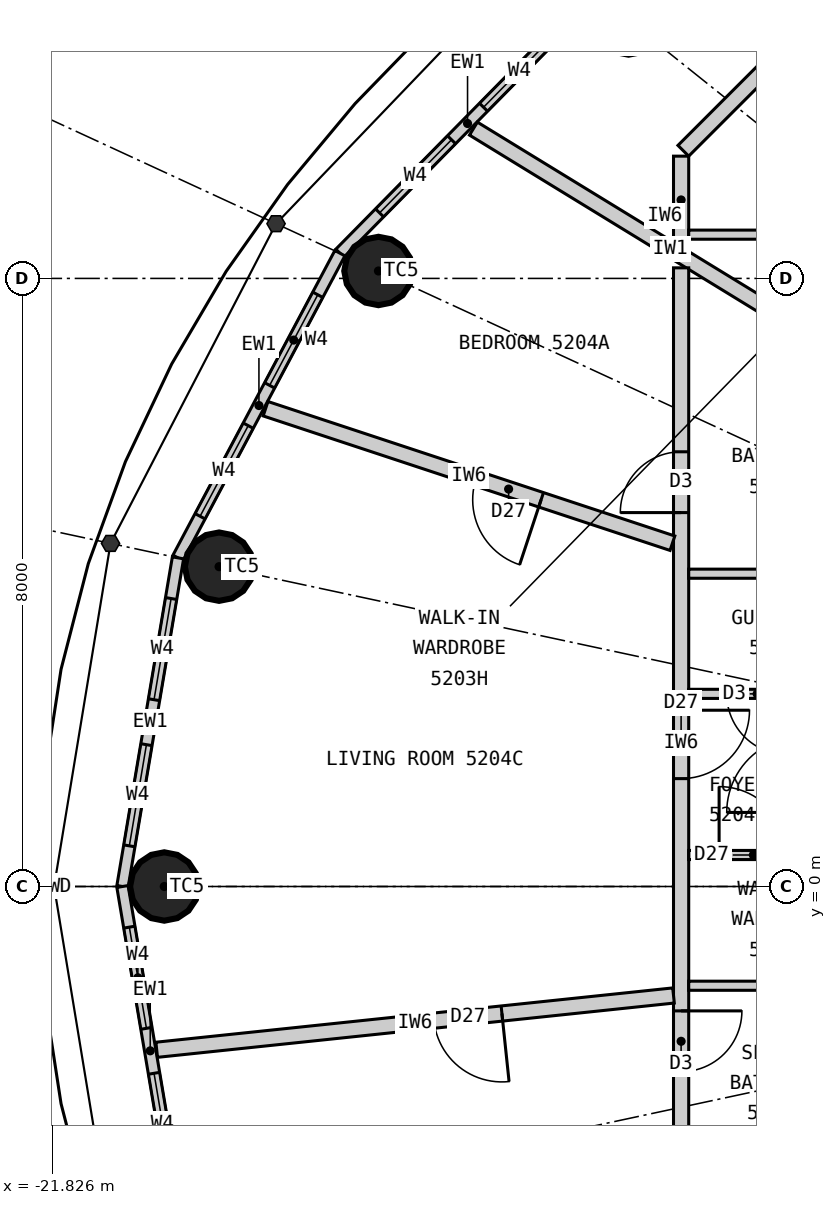
"""IFC4 building model, lengths in metres.
Left out: names, types, materials, properties, quantities, classifications, styles, units other than length and angle.
Written with IfcOpenShell. Run it as: python <this file> out.ifc"""

import sys

from ifc_helpers import new_model, si_unit, direction, frame, frame_2d, origin, origin_2d, place, context, subcontext, project, spatial, rectangle, circle, extrude, element, fill, save


model = new_model("IFC4")
c1 = context("Model", 3, precision=1e-05, world=origin(), true_north=direction((0.0, 1.0)))
c2 = subcontext(c1, "Body", "Model", "MODEL_VIEW")
j1 = project(units=[si_unit("LENGTHUNIT", "METRE"), si_unit("PLANEANGLEUNIT", "RADIAN")], contexts=[c1])
p1 = place(None, origin())
s1 = spatial("IfcSite", under=j1, at=p1, CompositionType="ELEMENT")
p2 = place(p1, origin())
s2 = spatial("IfcBuilding", under=s1, at=p2, CompositionType="ELEMENT")
p3 = place(p2, frame((0.0, 0.0, 196.2)))
s3 = spatial("IfcBuildingStorey", under=s2, at=p3, CompositionType="ELEMENT", Elevation=196.2)
for number, where, z_axis, x_axis in (
    (1, (-14.241, 11.393, 0.0), (0.0, 0.0, 1.0), (1.0, 0.0, 0.0)),
    (2, (-17.532, 8.098, 0.0), (0.0, 0.0, 1.0), (1.0, 0.0, 0.0)),
    (3, (-19.629, 4.208, 0.0), (0.0, 0.0, 1.0), (1.0, 0.0, 0.0)),
    (4, (-20.35, 0.0, 0.0), (0.0, 0.0, 1.0), (1.0, 0.0, 0.0)),
):
    element("IfcColumn", number, at=place(p3, frame(where, z_axis=z_axis, x_axis=x_axis)), inside=s3, PredefinedType="COLUMN", context=c2, shape_type="SweptSolid", body=[
        extrude(circle(Radius=0.45, at=origin_2d()), origin(), (0.0, 0.0, 1.0), 3.3),
    ])
p4 = place(p3, frame((-14.68, 11.744, 0.0), z_axis=(0.0, 0.0, 1.0), x_axis=(-0.701527379618, -0.712642501993, 0.0)))
e5 = element("IfcWall", 5, at=p4, inside=s3, PredefinedType="ELEMENTEDWALL", context=c2, shape_type="SweptSolid", body=[
    extrude(rectangle(XDim=4.788, YDim=0.15, at=frame_2d((2.394, 0.0))), origin(), (0.0, 0.0, 1.0), 3.12),
])
p5 = place(p4, frame((0.744, 0.0, 0.9)))
e6 = element("IfcOpeningElement", 6, at=p5, cuts=e5, PredefinedType="OPENING", context=c2, shape_type="SweptSolid", body=[
    extrude(rectangle(XDim=1.35, YDim=1.9, at=frame_2d((0.675, 0.95))), frame((0.0, 0.085, 0.0), z_axis=(0.0, -1.0, 0.0), x_axis=(1.0, 0.0, 0.0)), (0.0, 0.0, 1.0), 0.17),
])
p6 = place(p4, frame((2.694, 0.0, 0.9)))
e7 = element("IfcOpeningElement", 7, at=p6, cuts=e5, PredefinedType="OPENING", context=c2, shape_type="SweptSolid", body=[
    extrude(rectangle(XDim=1.35, YDim=1.9, at=frame_2d((0.675, 0.95))), frame((0.0, 0.085, 0.0), z_axis=(0.0, -1.0, 0.0), x_axis=(1.0, 0.0, 0.0)), (0.0, 0.0, 1.0), 0.17),
])
p7 = place(p3, frame((-18.04, 8.332, 0.0), z_axis=(0.0, 0.0, 1.0), x_axis=(-0.469256152955, -0.883062094597, 0.0)))
e8 = element("IfcWall", 8, at=p7, inside=s3, PredefinedType="ELEMENTEDWALL", context=c2, shape_type="SweptSolid", body=[
    extrude(rectangle(XDim=4.539, YDim=0.15, at=frame_2d((2.27, 0.0))), origin(), (0.0, 0.0, 1.0), 3.12),
])
p8 = place(p7, frame((0.62, 0.0, 0.9)))
e9 = element("IfcOpeningElement", 9, at=p8, cuts=e8, PredefinedType="OPENING", context=c2, shape_type="SweptSolid", body=[
    extrude(rectangle(XDim=1.35, YDim=1.9, at=frame_2d((0.675, 0.95))), frame((0.0, 0.085, 0.0), z_axis=(0.0, -1.0, 0.0), x_axis=(1.0, 0.0, 0.0)), (0.0, 0.0, 1.0), 0.17),
])
p9 = place(p7, frame((2.57, 0.0, 0.9)))
e10 = element("IfcOpeningElement", 10, at=p9, cuts=e8, PredefinedType="OPENING", context=c2, shape_type="SweptSolid", body=[
    extrude(rectangle(XDim=1.35, YDim=1.9, at=frame_2d((0.675, 0.95))), frame((0.0, 0.085, 0.0), z_axis=(0.0, -1.0, 0.0), x_axis=(1.0, 0.0, 0.0)), (0.0, 0.0, 1.0), 0.17),
])
p10 = place(p3, frame((-20.17, 4.323, 0.0), z_axis=(0.0, 0.0, 1.0), x_axis=(-0.166538513568, -0.986034950445, 0.0)))
e11 = element("IfcWall", 11, at=p10, inside=s3, PredefinedType="ELEMENTEDWALL", context=c2, shape_type="SweptSolid", body=[
    extrude(rectangle(XDim=4.385, YDim=0.15, at=frame_2d((2.192, 0.0))), origin(), (0.0, 0.0, 1.0), 3.12),
])
p11 = place(p10, frame((0.542, 0.0, 0.9)))
e12 = element("IfcOpeningElement", 12, at=p11, cuts=e11, PredefinedType="OPENING", context=c2, shape_type="SweptSolid", body=[
    extrude(rectangle(XDim=1.35, YDim=1.9, at=frame_2d((0.675, 0.95))), frame((0.0, 0.085, 0.0), z_axis=(0.0, -1.0, 0.0), x_axis=(1.0, 0.0, 0.0)), (0.0, 0.0, 1.0), 0.17),
])
p12 = place(p10, frame((2.492, 0.0, 0.9)))
e13 = element("IfcOpeningElement", 13, at=p12, cuts=e11, PredefinedType="OPENING", context=c2, shape_type="SweptSolid", body=[
    extrude(rectangle(XDim=1.35, YDim=1.9, at=frame_2d((0.675, 0.95))), frame((0.0, 0.085, 0.0), z_axis=(0.0, -1.0, 0.0), x_axis=(1.0, 0.0, 0.0)), (0.0, 0.0, 1.0), 0.17),
])
p13 = place(p3, frame((-20.9, 0.0, 0.0), z_axis=(0.0, 0.0, 1.0), x_axis=(0.166538513568, -0.986034950445, 0.0)))
e14 = element("IfcWall", 14, at=p13, inside=s3, PredefinedType="ELEMENTEDWALL", context=c2, shape_type="SweptSolid", body=[
    extrude(rectangle(XDim=4.385, YDim=0.15, at=frame_2d((2.192, 0.0))), origin(), (0.0, 0.0, 1.0), 3.12),
])
p14 = place(p13, frame((0.542, 0.0, 0.9)))
e15 = element("IfcOpeningElement", 15, at=p14, cuts=e14, PredefinedType="OPENING", context=c2, shape_type="SweptSolid", body=[
    extrude(rectangle(XDim=1.35, YDim=1.9, at=frame_2d((0.675, 0.95))), frame((0.0, 0.085, 0.0), z_axis=(0.0, -1.0, 0.0), x_axis=(1.0, 0.0, 0.0)), (0.0, 0.0, 1.0), 0.17),
])
p15 = place(p13, frame((2.492, 0.0, 0.9)))
e16 = element("IfcOpeningElement", 16, at=p15, cuts=e14, PredefinedType="OPENING", context=c2, shape_type="SweptSolid", body=[
    extrude(rectangle(XDim=1.35, YDim=1.9, at=frame_2d((0.675, 0.95))), frame((0.0, 0.085, 0.0), z_axis=(0.0, -1.0, 0.0), x_axis=(1.0, 0.0, 0.0)), (0.0, 0.0, 1.0), 0.17),
])
p16 = place(p3, frame((-11.1, 6.797, 0.0), z_axis=(0.0, 0.0, 1.0), x_axis=(-0.852799818179, 0.522237943963, 0.0)))
e17 = element("IfcWall", 17, at=p16, inside=s3, PredefinedType="PARTITIONING", context=c2, shape_type="SweptSolid", body=[
    extrude(rectangle(XDim=6.077, YDim=0.2, at=frame_2d((3.039, 0.0))), origin(), (0.0, 0.0, 1.0), 3.12),
])
p17 = place(p3, frame((-10.679, 12.521, 0.0), z_axis=(0.0, 0.0, 1.0), x_axis=(-0.707106781187, -0.707106781187, 0.0)))
e18 = element("IfcWall", 18, at=p17, inside=s3, PredefinedType="PARTITIONING", context=c2, shape_type="SweptSolid", body=[
    extrude(rectangle(XDim=4.019, YDim=0.2, at=frame_2d((2.009, 0.0))), origin(), (0.0, 0.0, 1.0), 3.12),
])
p18 = place(p3, frame((-13.55, 9.609, 0.0), z_axis=(0.0, 0.0, 1.0), x_axis=(0.0, -1.0, 0.0)))
e19 = element("IfcWall", 19, at=p18, inside=s3, PredefinedType="PARTITIONING", context=c2, shape_type="SweptSolid", body=[
    extrude(rectangle(XDim=1.153, YDim=0.2, at=frame_2d((0.576, 0.0))), origin(), (0.0, 0.0, 1.0), 3.12),
])
p19 = place(p3, frame((-11.1, 8.576, 0.0), z_axis=(0.0, 0.0, 1.0), x_axis=(-1.0, 0.0, 0.0)))
e20 = element("IfcWall", 20, at=p19, inside=s3, PredefinedType="PARTITIONING", context=c2, shape_type="SweptSolid", body=[
    extrude(rectangle(XDim=2.35, YDim=0.12, at=frame_2d((1.175, 0.0))), origin(), (0.0, 0.0, 1.0), 3.12),
])
p20 = place(p19, frame((0.22, 0.0, 0.0)))
e21 = element("IfcOpeningElement", 21, at=p20, cuts=e20, PredefinedType="OPENING", context=c2, shape_type="SweptSolid", body=[
    extrude(rectangle(XDim=0.9, YDim=2.1, at=frame_2d((0.45, 1.05))), frame((0.0, 0.07, 0.0), z_axis=(0.0, -1.0, 0.0), x_axis=(1.0, 0.0, 0.0)), (0.0, 0.0, 1.0), 0.14),
])
p21 = place(p3, frame((-13.55, 8.139, 0.0), z_axis=(0.0, 0.0, 1.0), x_axis=(0.0, -1.0, 0.0)))
e22 = element("IfcWall", 22, at=p21, inside=s3, PredefinedType="PARTITIONING", context=c2, shape_type="SweptSolid", body=[
    extrude(rectangle(XDim=12.496, YDim=0.2, at=frame_2d((6.248, 0.0))), origin(), (0.0, 0.0, 1.0), 3.12),
])
p22 = place(p21, frame((2.42, 0.0, 0.0)))
e23 = element("IfcOpeningElement", 23, at=p22, cuts=e22, PredefinedType="OPENING", context=c2, shape_type="SweptSolid", body=[
    extrude(rectangle(XDim=0.8, YDim=2.1, at=frame_2d((0.4, 1.05))), frame((0.0, 0.11, 0.0), z_axis=(0.0, -1.0, 0.0), x_axis=(1.0, 0.0, 0.0)), (0.0, 0.0, 1.0), 0.22),
])
p23 = place(p21, frame((9.776, 0.0, 0.0)))
e24 = element("IfcOpeningElement", 24, at=p23, cuts=e22, PredefinedType="OPENING", context=c2, shape_type="SweptSolid", body=[
    extrude(rectangle(XDim=0.8, YDim=2.1, at=frame_2d((0.4, 1.05))), frame((0.0, 0.11, 0.0), z_axis=(0.0, -1.0, 0.0), x_axis=(1.0, 0.0, 0.0)), (0.0, 0.0, 1.0), 0.22),
])
p24 = place(p21, frame((5.82, 0.0, 0.0)))
e25 = element("IfcOpeningElement", 25, at=p24, cuts=e22, PredefinedType="OPENING", context=c2, shape_type="SweptSolid", body=[
    extrude(rectangle(XDim=0.9, YDim=2.1, at=frame_2d((0.45, 1.05))), frame((0.0, 0.11, 0.0), z_axis=(0.0, -1.0, 0.0), x_axis=(1.0, 0.0, 0.0)), (0.0, 0.0, 1.0), 0.22),
])
p25 = place(p3, frame((-13.664, 4.516, 0.0), z_axis=(0.0, 0.0, 1.0), x_axis=(-0.949481375941, 0.313823384632, 0.0)))
e26 = element("IfcWall", 26, at=p25, inside=s3, PredefinedType="PARTITIONING", context=c2, shape_type="SweptSolid", body=[
    extrude(rectangle(XDim=5.638, YDim=0.2, at=frame_2d((2.819, 0.0))), origin(), (0.0, 0.0, 1.0), 3.12),
])
p26 = place(p25, frame((1.82, 0.0, 0.0)))
e27 = element("IfcOpeningElement", 27, at=p26, cuts=e26, PredefinedType="OPENING", context=c2, shape_type="SweptSolid", body=[
    extrude(rectangle(XDim=0.9, YDim=2.1, at=frame_2d((0.45, 1.05))), frame((0.0, 0.11, 0.0), z_axis=(0.0, -1.0, 0.0), x_axis=(1.0, 0.0, 0.0)), (0.0, 0.0, 1.0), 0.22),
])
p27 = place(p3, frame((-13.65, -1.434, 0.0), z_axis=(0.0, 0.0, 1.0), x_axis=(-0.994526954268, -0.10448031984, 0.0)))
e28 = element("IfcWall", 28, at=p27, inside=s3, PredefinedType="PARTITIONING", context=c2, shape_type="SweptSolid", body=[
    extrude(rectangle(XDim=6.837, YDim=0.2, at=frame_2d((3.418, 0.0))), origin(), (0.0, 0.0, 1.0), 2.47),
])
p28 = place(p27, frame((2.27, 0.0, 0.0)))
e29 = element("IfcOpeningElement", 29, at=p28, cuts=e28, PredefinedType="OPENING", context=c2, shape_type="SweptSolid", body=[
    extrude(rectangle(XDim=0.9, YDim=2.1, at=frame_2d((0.45, 1.05))), frame((0.0, 0.11, 0.0), z_axis=(0.0, -1.0, 0.0), x_axis=(1.0, 0.0, 0.0)), (0.0, 0.0, 1.0), 0.22),
])
p29 = place(p3, frame((-11.1, 4.115, 0.0), z_axis=(0.0, 0.0, 1.0), x_axis=(-1.0, 0.0, 0.0)))
e30 = element("IfcWall", 30, at=p29, inside=s3, PredefinedType="PARTITIONING", context=c2, shape_type="SweptSolid", body=[
    extrude(rectangle(XDim=2.35, YDim=0.12, at=frame_2d((1.175, 0.0))), origin(), (0.0, 0.0, 1.0), 3.12),
])
p30 = place(p3, frame((-11.1, 2.534, 0.0), z_axis=(0.0, 0.0, 1.0), x_axis=(-1.0, 0.0, 0.0)))
e31 = element("IfcWall", 31, at=p30, inside=s3, PredefinedType="PARTITIONING", context=c2, shape_type="SweptSolid", body=[
    extrude(rectangle(XDim=2.35, YDim=0.12, at=frame_2d((1.175, 0.0))), origin(), (0.0, 0.0, 1.0), 3.12),
])
p31 = place(p30, frame((1.05, 0.0, 0.0)))
e32 = element("IfcOpeningElement", 32, at=p31, cuts=e31, PredefinedType="OPENING", context=c2, shape_type="SweptSolid", body=[
    extrude(rectangle(XDim=0.8, YDim=2.1, at=frame_2d((0.4, 1.05))), frame((0.0, 0.07, 0.0), z_axis=(0.0, -1.0, 0.0), x_axis=(1.0, 0.0, 0.0)), (0.0, 0.0, 1.0), 0.14),
])
p32 = place(p3, frame((-11.1, 0.414, 0.0), z_axis=(0.0, 0.0, 1.0), x_axis=(-1.0, 0.0, 0.0)))
e33 = element("IfcWall", 33, at=p32, inside=s3, PredefinedType="PARTITIONING", context=c2, shape_type="SweptSolid", body=[
    extrude(rectangle(XDim=2.35, YDim=0.12, at=frame_2d((1.175, 0.0))), origin(), (0.0, 0.0, 1.0), 3.12),
])
p33 = place(p32, frame((1.05, 0.0, 0.0)))
e34 = element("IfcOpeningElement", 34, at=p33, cuts=e33, PredefinedType="OPENING", context=c2, shape_type="SweptSolid", body=[
    extrude(rectangle(XDim=0.9, YDim=2.1, at=frame_2d((0.45, 1.05))), frame((0.0, 0.07, 0.0), z_axis=(0.0, -1.0, 0.0), x_axis=(1.0, 0.0, 0.0)), (0.0, 0.0, 1.0), 0.14),
])
p34 = place(p3, frame((-11.1, -1.306, 0.0), z_axis=(0.0, 0.0, 1.0), x_axis=(-1.0, 0.0, 0.0)))
e35 = element("IfcWall", 35, at=p34, inside=s3, PredefinedType="PARTITIONING", context=c2, shape_type="SweptSolid", body=[
    extrude(rectangle(XDim=2.35, YDim=0.12, at=frame_2d((1.175, 0.0))), origin(), (0.0, 0.0, 1.0), 3.12),
])
p35 = place(p5, origin())
e36 = element("IfcWindow", 36, at=p35, inside=s3, PartitioningType="SINGLE_PANEL", PredefinedType="WINDOW", context=c2, shape_type="SweptSolid", body=[
    extrude(rectangle(XDim=1.35, YDim=1.9, at=frame_2d((0.675, 0.95))), frame((0.0, 0.03, 0.0), z_axis=(0.0, -1.0, 0.0), x_axis=(1.0, 0.0, 0.0)), (0.0, 0.0, 1.0), 0.06),
])
fill(e6, e36)
p36 = place(p6, origin())
e37 = element("IfcWindow", 37, at=p36, inside=s3, PartitioningType="SINGLE_PANEL", PredefinedType="WINDOW", context=c2, shape_type="SweptSolid", body=[
    extrude(rectangle(XDim=1.35, YDim=1.9, at=frame_2d((0.675, 0.95))), frame((0.0, 0.03, 0.0), z_axis=(0.0, -1.0, 0.0), x_axis=(1.0, 0.0, 0.0)), (0.0, 0.0, 1.0), 0.06),
])
fill(e7, e37)
p37 = place(p8, origin())
e38 = element("IfcWindow", 38, at=p37, inside=s3, PartitioningType="SINGLE_PANEL", PredefinedType="WINDOW", context=c2, shape_type="SweptSolid", body=[
    extrude(rectangle(XDim=1.35, YDim=1.9, at=frame_2d((0.675, 0.95))), frame((0.0, 0.03, 0.0), z_axis=(0.0, -1.0, 0.0), x_axis=(1.0, 0.0, 0.0)), (0.0, 0.0, 1.0), 0.06),
])
fill(e9, e38)
p38 = place(p9, origin())
e39 = element("IfcWindow", 39, at=p38, inside=s3, PartitioningType="SINGLE_PANEL", PredefinedType="WINDOW", context=c2, shape_type="SweptSolid", body=[
    extrude(rectangle(XDim=1.35, YDim=1.9, at=frame_2d((0.675, 0.95))), frame((0.0, 0.03, 0.0), z_axis=(0.0, -1.0, 0.0), x_axis=(1.0, 0.0, 0.0)), (0.0, 0.0, 1.0), 0.06),
])
fill(e10, e39)
p39 = place(p11, origin())
e40 = element("IfcWindow", 40, at=p39, inside=s3, PartitioningType="SINGLE_PANEL", PredefinedType="WINDOW", context=c2, shape_type="SweptSolid", body=[
    extrude(rectangle(XDim=1.35, YDim=1.9, at=frame_2d((0.675, 0.95))), frame((0.0, 0.03, 0.0), z_axis=(0.0, -1.0, 0.0), x_axis=(1.0, 0.0, 0.0)), (0.0, 0.0, 1.0), 0.06),
])
fill(e12, e40)
p40 = place(p12, origin())
e41 = element("IfcWindow", 41, at=p40, inside=s3, PartitioningType="SINGLE_PANEL", PredefinedType="WINDOW", context=c2, shape_type="SweptSolid", body=[
    extrude(rectangle(XDim=1.35, YDim=1.9, at=frame_2d((0.675, 0.95))), frame((0.0, 0.03, 0.0), z_axis=(0.0, -1.0, 0.0), x_axis=(1.0, 0.0, 0.0)), (0.0, 0.0, 1.0), 0.06),
])
fill(e13, e41)
p41 = place(p14, origin())
e42 = element("IfcWindow", 42, at=p41, inside=s3, PartitioningType="SINGLE_PANEL", PredefinedType="WINDOW", context=c2, shape_type="SweptSolid", body=[
    extrude(rectangle(XDim=1.35, YDim=1.9, at=frame_2d((0.675, 0.95))), frame((0.0, 0.03, 0.0), z_axis=(0.0, -1.0, 0.0), x_axis=(1.0, 0.0, 0.0)), (0.0, 0.0, 1.0), 0.06),
])
fill(e15, e42)
p42 = place(p15, origin())
e43 = element("IfcWindow", 43, at=p42, inside=s3, PartitioningType="SINGLE_PANEL", PredefinedType="WINDOW", context=c2, shape_type="SweptSolid", body=[
    extrude(rectangle(XDim=1.35, YDim=1.9, at=frame_2d((0.675, 0.95))), frame((0.0, 0.03, 0.0), z_axis=(0.0, -1.0, 0.0), x_axis=(1.0, 0.0, 0.0)), (0.0, 0.0, 1.0), 0.06),
])
fill(e16, e43)
p43 = place(p22, origin())
e44 = element("IfcDoor", 44, at=p43, inside=s3, OperationType="SINGLE_SWING_RIGHT", PredefinedType="DOOR", context=c2, shape_type="SweptSolid", body=[
    extrude(rectangle(XDim=0.8, YDim=2.1, at=frame_2d((0.4, 1.05))), frame((0.0, 0.025, 0.0), z_axis=(0.0, -1.0, 0.0), x_axis=(1.0, 0.0, 0.0)), (0.0, 0.0, 1.0), 0.05),
])
fill(e23, e44)
p44 = place(p31, origin())
e45 = element("IfcDoor", 45, at=p44, inside=s3, OperationType="SINGLE_SWING_LEFT", PredefinedType="DOOR", context=c2, shape_type="SweptSolid", body=[
    extrude(rectangle(XDim=0.8, YDim=2.1, at=frame_2d((0.4, 1.05))), frame((0.0, 0.025, 0.0), z_axis=(0.0, -1.0, 0.0), x_axis=(1.0, 0.0, 0.0)), (0.0, 0.0, 1.0), 0.05),
])
fill(e32, e45)
p45 = place(p33, origin())
e46 = element("IfcDoor", 46, at=p45, inside=s3, OperationType="SINGLE_SWING_RIGHT", PredefinedType="DOOR", context=c2, shape_type="SweptSolid", body=[
    extrude(rectangle(XDim=0.9, YDim=2.1, at=frame_2d((0.45, 1.05))), frame((0.0, 0.025, 0.0), z_axis=(0.0, -1.0, 0.0), x_axis=(1.0, 0.0, 0.0)), (0.0, 0.0, 1.0), 0.05),
])
fill(e34, e46)
p46 = place(p23, origin())
e47 = element("IfcDoor", 47, at=p46, inside=s3, OperationType="SINGLE_SWING_LEFT", PredefinedType="DOOR", context=c2, shape_type="SweptSolid", body=[
    extrude(rectangle(XDim=0.8, YDim=2.1, at=frame_2d((0.4, 1.05))), frame((0.0, 0.025, 0.0), z_axis=(0.0, -1.0, 0.0), x_axis=(1.0, 0.0, 0.0)), (0.0, 0.0, 1.0), 0.05),
])
fill(e24, e47)
p47 = place(p24, origin())
e48 = element("IfcDoor", 48, at=p47, inside=s3, OperationType="SINGLE_SWING_LEFT", PredefinedType="DOOR", context=c2, shape_type="SweptSolid", body=[
    extrude(rectangle(XDim=0.9, YDim=2.1, at=frame_2d((0.45, 1.05))), frame((0.0, 0.025, 0.0), z_axis=(0.0, -1.0, 0.0), x_axis=(1.0, 0.0, 0.0)), (0.0, 0.0, 1.0), 0.05),
])
fill(e25, e48)
p48 = place(p26, origin())
e49 = element("IfcDoor", 49, at=p48, inside=s3, OperationType="SINGLE_SWING_LEFT", PredefinedType="DOOR", context=c2, shape_type="SweptSolid", body=[
    extrude(rectangle(XDim=0.9, YDim=2.1, at=frame_2d((0.45, 1.05))), frame((0.0, 0.025, 0.0), z_axis=(0.0, -1.0, 0.0), x_axis=(1.0, 0.0, 0.0)), (0.0, 0.0, 1.0), 0.05),
])
fill(e27, e49)
p49 = place(p28, origin())
e50 = element("IfcDoor", 50, at=p49, inside=s3, OperationType="SINGLE_SWING_LEFT", PredefinedType="DOOR", context=c2, shape_type="SweptSolid", body=[
    extrude(rectangle(XDim=0.9, YDim=2.1, at=frame_2d((0.45, 1.05))), frame((0.0, 0.025, 0.0), z_axis=(0.0, -1.0, 0.0), x_axis=(1.0, 0.0, 0.0)), (0.0, 0.0, 1.0), 0.05),
])
fill(e29, e50)
save(model, sys.argv[1])
